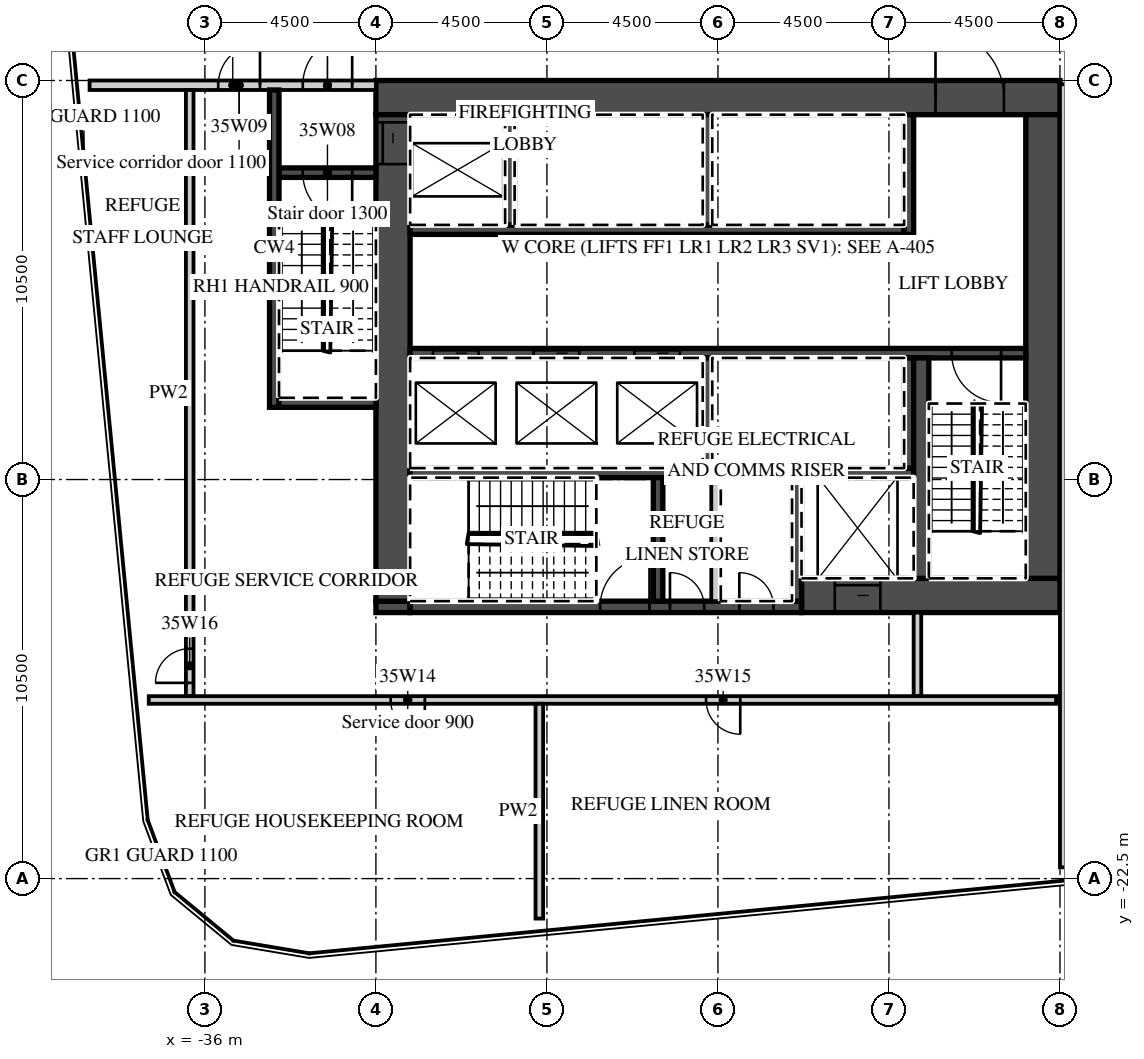
"""IFC4 building model, lengths in metres.
Left out: names, types, materials, properties, quantities, classifications, styles, units other than length and angle.
Written with IfcOpenShell. Run it as: python <this file> out.ifc"""

import sys

from ifc_helpers import new_model, si_unit, direction, frame, frame_2d, origin, place, context, subcontext, project, spatial, rectangle, extrude, element, fill, save


model = new_model("IFC4")
c1 = context("Model", 3, precision=1e-05, world=origin(), true_north=direction((0.0, 1.0)))
c2 = subcontext(c1, "Body", "Model", "MODEL_VIEW")
j1 = project(units=[si_unit("LENGTHUNIT", "METRE"), si_unit("PLANEANGLEUNIT", "RADIAN")], contexts=[c1])
p1 = place(None, origin())
s1 = spatial("IfcSite", under=j1, at=p1, CompositionType="ELEMENT")
p2 = place(p1, origin())
s2 = spatial("IfcBuilding", under=s1, at=p2, CompositionType="ELEMENT")
p3 = place(p2, frame((0.0, 0.0, 150.4)))
s3 = spatial("IfcBuildingStorey", under=s2, at=p3, CompositionType="ELEMENT", Elevation=150.4)
p4 = place(p3, frame((-31.5, -1.95, 0.0), z_axis=(0.0, 0.0, 1.0), x_axis=(1.0, 0.0, 0.0)))
e1 = element("IfcWall", 1, at=p4, inside=s3, PredefinedType="SHEAR", context=c2, shape_type="SweptSolid", body=[
    extrude(rectangle(XDim=18.0, YDim=0.9, at=frame_2d((9.0, 0.0))), origin(), (0.0, 0.0, 1.0), 4.2),
])
p5 = place(p4, frame((14.725, 0.0, 0.0)))
e2 = element("IfcOpeningElement", 2, at=p5, cuts=e1, PredefinedType="OPENING", context=c2, shape_type="SweptSolid", body=[
    extrude(rectangle(XDim=1.8, YDim=2.1, at=frame_2d((0.9, 1.05))), frame((0.0, 0.46, 0.0), z_axis=(0.0, -1.0, 0.0), x_axis=(1.0, 0.0, 0.0)), (0.0, 0.0, 1.0), 0.92),
])
p6 = place(p3, frame((-20.3, -15.05, 0.0), z_axis=(0.0, 0.0, 1.0), x_axis=(1.0, 0.0, 0.0)))
e3 = element("IfcWall", 3, at=p6, inside=s3, PredefinedType="SHEAR", context=c2, shape_type="SweptSolid", body=[
    extrude(rectangle(XDim=6.8, YDim=0.9, at=frame_2d((3.4, 0.0))), origin(), (0.0, 0.0, 1.0), 4.2),
])
p7 = place(p6, frame((0.875, 0.0, 0.0)))
e4 = element("IfcOpeningElement", 4, at=p7, cuts=e3, PredefinedType="OPENING", context=c2, shape_type="SweptSolid", body=[
    extrude(rectangle(XDim=1.2, YDim=2.1, at=frame_2d((0.6, 1.05))), frame((0.0, 0.46, 0.0), z_axis=(0.0, -1.0, 0.0), x_axis=(1.0, 0.0, 0.0)), (0.0, 0.0, 1.0), 0.92),
])
p8 = place(p3, frame((-31.5, -15.35, 0.0), z_axis=(0.0, 0.0, 1.0), x_axis=(1.0, 0.0, 0.0)))
e5 = element("IfcWall", 5, at=p8, inside=s3, PredefinedType="SHEAR", context=c2, shape_type="SweptSolid", body=[
    extrude(rectangle(XDim=0.9, YDim=0.3, at=frame_2d((0.45, 0.0))), origin(), (0.0, 0.0, 1.0), 4.2),
])
p9 = place(p3, frame((-30.6, -15.35, 0.0), z_axis=(0.0, 0.0, 1.0), x_axis=(1.0, 0.0, 0.0)))
e6 = element("IfcWall", 6, at=p9, inside=s3, PredefinedType="SHEAR", context=c2, shape_type="SweptSolid", body=[
    extrude(rectangle(XDim=10.3, YDim=0.3, at=frame_2d((5.15, 0.0))), origin(), (0.0, 0.0, 1.0), 4.2),
])
p10 = place(p9, frame((5.0, 0.0, 0.0)))
e7 = element("IfcOpeningElement", 7, at=p10, cuts=e6, PredefinedType="OPENING", context=c2, shape_type="SweptSolid", body=[
    extrude(rectangle(XDim=1.3, YDim=2.1, at=frame_2d((0.65, 1.05))), frame((0.0, 0.16, 0.0), z_axis=(0.0, -1.0, 0.0), x_axis=(1.0, 0.0, 0.0)), (0.0, 0.0, 1.0), 0.32),
])
p11 = place(p9, frame((6.837, 0.0, 0.0)))
e8 = element("IfcOpeningElement", 8, at=p11, cuts=e6, PredefinedType="OPENING", context=c2, shape_type="SweptSolid", body=[
    extrude(rectangle(XDim=0.9, YDim=2.1, at=frame_2d((0.45, 1.05))), frame((0.0, 0.16, 0.0), z_axis=(0.0, -1.0, 0.0), x_axis=(1.0, 0.0, 0.0)), (0.0, 0.0, 1.0), 0.32),
])
p12 = place(p9, frame((8.663, 0.0, 0.0)))
e9 = element("IfcOpeningElement", 9, at=p12, cuts=e6, PredefinedType="OPENING", context=c2, shape_type="SweptSolid", body=[
    extrude(rectangle(XDim=0.9, YDim=2.1, at=frame_2d((0.45, 1.05))), frame((0.0, 0.16, 0.0), z_axis=(0.0, -1.0, 0.0), x_axis=(1.0, 0.0, 0.0)), (0.0, 0.0, 1.0), 0.32),
])
p13 = place(p3, frame((-31.05, -15.2, 0.0), z_axis=(0.0, 0.0, 1.0), x_axis=(0.0, 1.0, 0.0)))
e10 = element("IfcWall", 10, at=p13, inside=s3, PredefinedType="SHEAR", context=c2, shape_type="SweptSolid", body=[
    extrude(rectangle(XDim=12.8, YDim=0.9, at=frame_2d((6.4, 0.0))), origin(), (0.0, 0.0, 1.0), 4.2),
])
p14 = place(p13, frame((11.5, 0.0, 0.0)))
e11 = element("IfcOpeningElement", 11, at=p14, cuts=e10, PredefinedType="OPENING", context=c2, shape_type="SweptSolid", body=[
    extrude(rectangle(XDim=1.1, YDim=2.1, at=frame_2d((0.55, 1.05))), frame((0.0, 0.46, 0.0), z_axis=(0.0, -1.0, 0.0), x_axis=(1.0, 0.0, 0.0)), (0.0, 0.0, 1.0), 0.92),
])
p15 = place(p3, frame((-13.95, -14.6, 0.0), z_axis=(0.0, 0.0, 1.0), x_axis=(0.0, 1.0, 0.0)))
e12 = element("IfcWall", 12, at=p15, inside=s3, PredefinedType="SHEAR", context=c2, shape_type="SweptSolid", body=[
    extrude(rectangle(XDim=12.2, YDim=0.9, at=frame_2d((6.1, 0.0))), origin(), (0.0, 0.0, 1.0), 4.2),
])
p16 = place(p3, frame((-30.6, -5.425, 0.0), z_axis=(0.0, 0.0, 1.0), x_axis=(1.0, 0.0, 0.0)))
e13 = element("IfcWall", 13, at=p16, inside=s3, PredefinedType="SHEAR", context=c2, shape_type="SweptSolid", body=[
    extrude(rectangle(XDim=13.0, YDim=0.25, at=frame_2d((6.5, 0.0))), origin(), (0.0, 0.0, 1.0), 4.2),
])
p17 = place(p3, frame((-17.475, -5.55, 0.0), z_axis=(0.0, 0.0, 1.0), x_axis=(0.0, 1.0, 0.0)))
e14 = element("IfcWall", 14, at=p17, inside=s3, PredefinedType="SHEAR", context=c2, shape_type="SweptSolid", body=[
    extrude(rectangle(XDim=3.15, YDim=0.25, at=frame_2d((1.575, 0.0))), origin(), (0.0, 0.0, 1.0), 4.2),
])
for number, where, z_axis, x_axis in (
    (15, (-27.975, -5.3, 0.0), (0.0, 0.0, 1.0), (0.0, 1.0, 0.0)),
    (16, (-22.775, -5.3, 0.0), (0.0, 0.0, 1.0), (0.0, 1.0, 0.0)),
):
    element("IfcWall", number, at=place(p3, frame(where, z_axis=z_axis, x_axis=x_axis)), inside=s3, PredefinedType="SHEAR", context=c2, shape_type="SweptSolid", body=[
        extrude(rectangle(XDim=2.9, YDim=0.25, at=frame_2d((1.45, 0.0))), origin(), (0.0, 0.0, 1.0), 4.2),
    ])
p18 = place(p3, frame((-30.6, -8.675, 0.0), z_axis=(0.0, 0.0, 1.0), x_axis=(1.0, 0.0, 0.0)))
e17 = element("IfcWall", 17, at=p18, inside=s3, PredefinedType="SHEAR", context=c2, shape_type="SweptSolid", body=[
    extrude(rectangle(XDim=16.2, YDim=0.25, at=frame_2d((8.1, 0.0))), origin(), (0.0, 0.0, 1.0), 4.2),
])
p19 = place(p18, frame((0.6, 0.0, 0.0)))
e18 = element("IfcOpeningElement", 18, at=p19, cuts=e17, PredefinedType="OPENING", context=c2, shape_type="SweptSolid", body=[
    extrude(rectangle(XDim=1.2, YDim=2.1, at=frame_2d((0.6, 1.05))), frame((0.0, 0.135, 0.0), z_axis=(0.0, -1.0, 0.0), x_axis=(1.0, 0.0, 0.0)), (0.0, 0.0, 1.0), 0.27),
])
p20 = place(p18, frame((3.25, 0.0, 0.0)))
e19 = element("IfcOpeningElement", 19, at=p20, cuts=e17, PredefinedType="OPENING", context=c2, shape_type="SweptSolid", body=[
    extrude(rectangle(XDim=1.2, YDim=2.1, at=frame_2d((0.6, 1.05))), frame((0.0, 0.135, 0.0), z_axis=(0.0, -1.0, 0.0), x_axis=(1.0, 0.0, 0.0)), (0.0, 0.0, 1.0), 0.27),
])
p21 = place(p18, frame((5.9, 0.0, 0.0)))
e20 = element("IfcOpeningElement", 20, at=p21, cuts=e17, PredefinedType="OPENING", context=c2, shape_type="SweptSolid", body=[
    extrude(rectangle(XDim=1.2, YDim=2.1, at=frame_2d((0.6, 1.05))), frame((0.0, 0.135, 0.0), z_axis=(0.0, -1.0, 0.0), x_axis=(1.0, 0.0, 0.0)), (0.0, 0.0, 1.0), 0.27),
])
p22 = place(p18, frame((14.25, 0.0, 0.0)))
e21 = element("IfcOpeningElement", 21, at=p22, cuts=e17, PredefinedType="OPENING", context=c2, shape_type="SweptSolid", body=[
    extrude(rectangle(XDim=1.3, YDim=2.1, at=frame_2d((0.65, 1.05))), frame((0.0, 0.135, 0.0), z_axis=(0.0, -1.0, 0.0), x_axis=(1.0, 0.0, 0.0)), (0.0, 0.0, 1.0), 0.27),
])
p23 = place(p3, frame((-30.6, -11.825, 0.0), z_axis=(0.0, 0.0, 1.0), x_axis=(1.0, 0.0, 0.0)))
e22 = element("IfcWall", 22, at=p23, inside=s3, PredefinedType="SHEAR", context=c2, shape_type="SweptSolid", body=[
    extrude(rectangle(XDim=13.25, YDim=0.25, at=frame_2d((6.625, 0.0))), origin(), (0.0, 0.0, 1.0), 4.2),
])
for number, where, z_axis, x_axis in (
    (23, (-17.475, -11.7, 0.0), (0.0, 0.0, 1.0), (0.0, 1.0, 0.0)),
    (24, (-22.775, -11.7, 0.0), (0.0, 0.0, 1.0), (0.0, 1.0, 0.0)),
):
    element("IfcWall", number, at=place(p3, frame(where, z_axis=z_axis, x_axis=x_axis)), inside=s3, PredefinedType="SHEAR", context=c2, shape_type="SweptSolid", body=[
        extrude(rectangle(XDim=2.9, YDim=0.25, at=frame_2d((1.45, 0.0))), origin(), (0.0, 0.0, 1.0), 4.2),
    ])
p24 = place(p3, frame((-17.15, -14.6, 0.0), z_axis=(0.0, 0.0, 1.0), x_axis=(0.0, 1.0, 0.0)))
e25 = element("IfcWall", 25, at=p24, inside=s3, PredefinedType="SHEAR", context=c2, shape_type="SweptSolid", body=[
    extrude(rectangle(XDim=5.8, YDim=0.4, at=frame_2d((2.9, 0.0))), origin(), (0.0, 0.0, 1.0), 4.2),
])
for number, where, z_axis, x_axis in (
    (26, (-20.425, -15.2, 0.0), (0.0, 0.0, 1.0), (0.0, 1.0, 0.0)),
    (27, (-24.075, -15.2, 0.0), (0.0, 0.0, 1.0), (0.0, 1.0, 0.0)),
):
    element("IfcWall", number, at=place(p3, frame(where, z_axis=z_axis, x_axis=x_axis)), inside=s3, PredefinedType="SHEAR", context=c2, shape_type="SweptSolid", body=[
        extrude(rectangle(XDim=3.25, YDim=0.25, at=frame_2d((1.625, 0.0))), origin(), (0.0, 0.0, 1.0), 4.2),
    ])
p25 = place(p3, frame((-22.55, -15.2, 0.0), z_axis=(0.0, 0.0, 1.0), x_axis=(0.0, 1.0, 0.0)))
e28 = element("IfcWall", 28, at=p25, inside=s3, PredefinedType="PARTITIONING", context=c2, shape_type="SweptSolid", body=[
    extrude(rectangle(XDim=3.25, YDim=0.25, at=frame_2d((1.625, 0.0))), origin(), (0.0, 0.0, 1.0), 4.2),
])
p26 = place(p3, frame((-39.035, -1.625, 0.0), z_axis=(0.0, 0.0, 1.0), x_axis=(1.0, 0.0, 0.0)))
e29 = element("IfcWall", 29, at=p26, inside=s3, PredefinedType="PARTITIONING", context=c2, shape_type="SweptSolid", body=[
    extrude(rectangle(XDim=7.535, YDim=0.25, at=frame_2d((3.768, 0.0))), origin(), (0.0, 0.0, 1.0), 4.2),
])
p27 = place(p26, frame((5.61, 0.0, 0.0)))
e30 = element("IfcOpeningElement", 30, at=p27, cuts=e29, PredefinedType="OPENING", context=c2, shape_type="SweptSolid", body=[
    extrude(rectangle(XDim=1.3, YDim=2.1, at=frame_2d((0.65, 1.05))), frame((0.0, 0.135, 0.0), z_axis=(0.0, -1.0, 0.0), x_axis=(1.0, 0.0, 0.0)), (0.0, 0.0, 1.0), 0.27),
])
p28 = place(p26, frame((3.385, 0.0, 0.0)))
e31 = element("IfcOpeningElement", 31, at=p28, cuts=e29, PredefinedType="OPENING", context=c2, shape_type="SweptSolid", body=[
    extrude(rectangle(XDim=1.1, YDim=2.1, at=frame_2d((0.55, 1.05))), frame((0.0, 0.135, 0.0), z_axis=(0.0, -1.0, 0.0), x_axis=(1.0, 0.0, 0.0)), (0.0, 0.0, 1.0), 0.27),
])
p29 = place(p3, frame((-34.05, -3.925, 0.0), z_axis=(0.0, 0.0, 1.0), x_axis=(1.0, 0.0, 0.0)))
e32 = element("IfcWall", 32, at=p29, inside=s3, PredefinedType="SHEAR", context=c2, shape_type="SweptSolid", body=[
    extrude(rectangle(XDim=2.55, YDim=0.25, at=frame_2d((1.275, 0.0))), origin(), (0.0, 0.0, 1.0), 4.2),
])
p30 = place(p29, frame((0.625, 0.0, 0.0)))
e33 = element("IfcOpeningElement", 33, at=p30, cuts=e32, PredefinedType="OPENING", context=c2, shape_type="SweptSolid", body=[
    extrude(rectangle(XDim=1.3, YDim=2.1, at=frame_2d((0.65, 1.05))), frame((0.0, 0.135, 0.0), z_axis=(0.0, -1.0, 0.0), x_axis=(1.0, 0.0, 0.0)), (0.0, 0.0, 1.0), 0.27),
])
p31 = place(p3, frame((-34.175, -10.1, 0.0), z_axis=(0.0, 0.0, 1.0), x_axis=(0.0, 1.0, 0.0)))
e34 = element("IfcWall", 34, at=p31, inside=s3, PredefinedType="SHEAR", context=c2, shape_type="SweptSolid", body=[
    extrude(rectangle(XDim=8.35, YDim=0.25, at=frame_2d((4.175, 0.0))), origin(), (0.0, 0.0, 1.0), 4.2),
])
p32 = place(p3, frame((-34.05, -9.975, 0.0), z_axis=(0.0, 0.0, 1.0), x_axis=(1.0, 0.0, 0.0)))
e35 = element("IfcWall", 35, at=p32, inside=s3, PredefinedType="SHEAR", context=c2, shape_type="SweptSolid", body=[
    extrude(rectangle(XDim=2.55, YDim=0.25, at=frame_2d((1.275, 0.0))), origin(), (0.0, 0.0, 1.0), 4.2),
])
p33 = place(p3, frame((-17.25, -17.7, 0.0), z_axis=(0.0, 0.0, 1.0), x_axis=(0.0, 1.0, 0.0)))
e36 = element("IfcWall", 36, at=p33, inside=s3, PredefinedType="PARTITIONING", context=c2, shape_type="SweptSolid", body=[
    extrude(rectangle(XDim=2.2, YDim=0.2, at=frame_2d((1.1, 0.0))), origin(), (0.0, 0.0, 1.0), 4.2),
])
p34 = place(p3, frame((-36.4, -17.7, 0.0), z_axis=(0.0, 0.0, 1.0), x_axis=(0.0, 1.0, 0.0)))
e37 = element("IfcWall", 37, at=p34, inside=s3, PredefinedType="PARTITIONING", context=c2, shape_type="SweptSolid", body=[
    extrude(rectangle(XDim=15.95, YDim=0.2, at=frame_2d((7.975, 0.0))), origin(), (0.0, 0.0, 1.0), 4.2),
])
p35 = place(p34, frame((0.35, 0.0, 0.0)))
e38 = element("IfcOpeningElement", 38, at=p35, cuts=e37, PredefinedType="OPENING", context=c2, shape_type="SweptSolid", body=[
    extrude(rectangle(XDim=0.9, YDim=2.1, at=frame_2d((0.45, 1.05))), frame((0.0, 0.11, 0.0), z_axis=(0.0, -1.0, 0.0), x_axis=(1.0, 0.0, 0.0)), (0.0, 0.0, 1.0), 0.22),
])
p36 = place(p3, frame((-37.477, -17.8, 0.0), z_axis=(0.0, 0.0, 1.0), x_axis=(1.0, 0.0, 0.0)))
e39 = element("IfcWall", 39, at=p36, inside=s3, PredefinedType="PARTITIONING", context=c2, shape_type="SweptSolid", body=[
    extrude(rectangle(XDim=23.877, YDim=0.2, at=frame_2d((11.938, 0.0))), origin(), (0.0, 0.0, 1.0), 4.2),
])
p37 = place(p36, frame((6.365, 0.0, 0.0)))
e40 = element("IfcOpeningElement", 40, at=p37, cuts=e39, PredefinedType="OPENING", context=c2, shape_type="SweptSolid", body=[
    extrude(rectangle(XDim=0.9, YDim=2.1, at=frame_2d((0.45, 1.05))), frame((0.0, 0.11, 0.0), z_axis=(0.0, -1.0, 0.0), x_axis=(1.0, 0.0, 0.0)), (0.0, 0.0, 1.0), 0.22),
])
p38 = place(p36, frame((14.665, 0.0, 0.0)))
e41 = element("IfcOpeningElement", 41, at=p38, cuts=e39, PredefinedType="OPENING", context=c2, shape_type="SweptSolid", body=[
    extrude(rectangle(XDim=0.9, YDim=2.1, at=frame_2d((0.45, 1.05))), frame((0.0, 0.11, 0.0), z_axis=(0.0, -1.0, 0.0), x_axis=(1.0, 0.0, 0.0)), (0.0, 0.0, 1.0), 0.22),
])
p39 = place(p3, frame((-27.2, -23.552, 0.0), z_axis=(0.0, 0.0, 1.0), x_axis=(0.0, 1.0, 0.0)))
e42 = element("IfcWall", 42, at=p39, inside=s3, PredefinedType="PARTITIONING", context=c2, shape_type="SweptSolid", body=[
    extrude(rectangle(XDim=5.653, YDim=0.2, at=frame_2d((2.826, 0.0))), origin(), (0.0, 0.0, 1.0), 4.2),
])
p40 = place(p3, frame((-13.4, -22.204, 0.0), z_axis=(0.0, 0.0, 1.0), x_axis=(0.0, 1.0, 0.0)))
e43 = element("IfcWall", 43, at=p40, inside=s3, PredefinedType="PARTITIONING", context=c2, shape_type="SweptSolid", body=[
    extrude(rectangle(XDim=20.604, YDim=0.2, at=frame_2d((10.302, 0.0))), origin(), (0.0, 0.0, 1.0), 4.2),
])
p41 = place(p19, origin())
e44 = element("IfcDoor", 44, at=p41, inside=s3, OperationType="SLIDING_TO_LEFT", PredefinedType="DOOR", context=c2, shape_type="SweptSolid", body=[
    extrude(rectangle(XDim=1.2, YDim=2.1, at=frame_2d((0.6, 1.05))), frame((0.0, 0.025, 0.0), z_axis=(0.0, -1.0, 0.0), x_axis=(1.0, 0.0, 0.0)), (0.0, 0.0, 1.0), 0.05),
])
fill(e18, e44)
p42 = place(p20, origin())
e45 = element("IfcDoor", 45, at=p42, inside=s3, OperationType="SLIDING_TO_RIGHT", PredefinedType="DOOR", context=c2, shape_type="SweptSolid", body=[
    extrude(rectangle(XDim=1.2, YDim=2.1, at=frame_2d((0.6, 1.05))), frame((0.0, 0.025, 0.0), z_axis=(0.0, -1.0, 0.0), x_axis=(1.0, 0.0, 0.0)), (0.0, 0.0, 1.0), 0.05),
])
fill(e19, e45)
p43 = place(p21, origin())
e46 = element("IfcDoor", 46, at=p43, inside=s3, OperationType="SLIDING_TO_RIGHT", PredefinedType="DOOR", context=c2, shape_type="SweptSolid", body=[
    extrude(rectangle(XDim=1.2, YDim=2.1, at=frame_2d((0.6, 1.05))), frame((0.0, 0.025, 0.0), z_axis=(0.0, -1.0, 0.0), x_axis=(1.0, 0.0, 0.0)), (0.0, 0.0, 1.0), 0.05),
])
fill(e20, e46)
p44 = place(p7, origin())
e47 = element("IfcDoor", 47, at=p44, inside=s3, OperationType="SLIDING_TO_LEFT", PredefinedType="DOOR", context=c2, shape_type="SweptSolid", body=[
    extrude(rectangle(XDim=1.2, YDim=2.1, at=frame_2d((0.6, 1.05))), frame((0.0, 0.025, 0.0), z_axis=(0.0, -1.0, 0.0), x_axis=(1.0, 0.0, 0.0)), (0.0, 0.0, 1.0), 0.05),
])
fill(e4, e47)
p45 = place(p14, origin())
e48 = element("IfcDoor", 48, at=p45, inside=s3, OperationType="SLIDING_TO_RIGHT", PredefinedType="DOOR", context=c2, shape_type="SweptSolid", body=[
    extrude(rectangle(XDim=1.1, YDim=2.1, at=frame_2d((0.55, 1.05))), frame((0.0, 0.025, 0.0), z_axis=(0.0, -1.0, 0.0), x_axis=(1.0, 0.0, 0.0)), (0.0, 0.0, 1.0), 0.05),
])
fill(e11, e48)
p46 = place(p5, origin())
e49 = element("IfcDoor", 49, at=p46, inside=s3, OperationType="DOUBLE_DOOR_DOUBLE_SWING", PredefinedType="DOOR", context=c2, shape_type="SweptSolid", body=[
    extrude(rectangle(XDim=1.8, YDim=2.1, at=frame_2d((0.9, 1.05))), frame((0.0, 0.025, 0.0), z_axis=(0.0, -1.0, 0.0), x_axis=(1.0, 0.0, 0.0)), (0.0, 0.0, 1.0), 0.05),
])
fill(e2, e49)
p47 = place(p27, origin())
e50 = element("IfcDoor", 50, at=p47, inside=s3, OperationType="SINGLE_SWING_RIGHT", PredefinedType="DOOR", context=c2, shape_type="SweptSolid", body=[
    extrude(rectangle(XDim=1.3, YDim=2.1, at=frame_2d((0.65, 1.05))), frame((0.0, 0.025, 0.0), z_axis=(0.0, -1.0, 0.0), x_axis=(1.0, 0.0, 0.0)), (0.0, 0.0, 1.0), 0.05),
])
fill(e30, e50)
p48 = place(p30, origin())
e51 = element("IfcDoor", 51, at=p48, inside=s3, OperationType="SINGLE_SWING_RIGHT", PredefinedType="DOOR", context=c2, shape_type="SweptSolid", body=[
    extrude(rectangle(XDim=1.3, YDim=2.1, at=frame_2d((0.65, 1.05))), frame((0.0, 0.025, 0.0), z_axis=(0.0, -1.0, 0.0), x_axis=(1.0, 0.0, 0.0)), (0.0, 0.0, 1.0), 0.05),
])
fill(e33, e51)
p49 = place(p28, origin())
e52 = element("IfcDoor", 52, at=p49, inside=s3, OperationType="SINGLE_SWING_RIGHT", PredefinedType="DOOR", context=c2, shape_type="SweptSolid", body=[
    extrude(rectangle(XDim=1.1, YDim=2.1, at=frame_2d((0.55, 1.05))), frame((0.0, 0.025, 0.0), z_axis=(0.0, -1.0, 0.0), x_axis=(1.0, 0.0, 0.0)), (0.0, 0.0, 1.0), 0.05),
])
fill(e31, e52)
p50 = place(p22, origin())
e53 = element("IfcDoor", 53, at=p50, inside=s3, OperationType="SINGLE_SWING_RIGHT", PredefinedType="DOOR", context=c2, shape_type="SweptSolid", body=[
    extrude(rectangle(XDim=1.3, YDim=2.1, at=frame_2d((0.65, 1.05))), frame((0.0, 0.025, 0.0), z_axis=(0.0, -1.0, 0.0), x_axis=(1.0, 0.0, 0.0)), (0.0, 0.0, 1.0), 0.05),
])
fill(e21, e53)
p51 = place(p10, origin())
e54 = element("IfcDoor", 54, at=p51, inside=s3, OperationType="SINGLE_SWING_RIGHT", PredefinedType="DOOR", context=c2, shape_type="SweptSolid", body=[
    extrude(rectangle(XDim=1.3, YDim=2.1, at=frame_2d((0.65, 1.05))), frame((0.0, 0.025, 0.0), z_axis=(0.0, -1.0, 0.0), x_axis=(1.0, 0.0, 0.0)), (0.0, 0.0, 1.0), 0.05),
])
fill(e7, e54)
p52 = place(p11, origin())
e55 = element("IfcDoor", 55, at=p52, inside=s3, OperationType="SINGLE_SWING_LEFT", PredefinedType="DOOR", context=c2, shape_type="SweptSolid", body=[
    extrude(rectangle(XDim=0.9, YDim=2.1, at=frame_2d((0.45, 1.05))), frame((0.0, 0.025, 0.0), z_axis=(0.0, -1.0, 0.0), x_axis=(1.0, 0.0, 0.0)), (0.0, 0.0, 1.0), 0.05),
])
fill(e8, e55)
p53 = place(p12, origin())
e56 = element("IfcDoor", 56, at=p53, inside=s3, OperationType="SINGLE_SWING_LEFT", PredefinedType="DOOR", context=c2, shape_type="SweptSolid", body=[
    extrude(rectangle(XDim=0.9, YDim=2.1, at=frame_2d((0.45, 1.05))), frame((0.0, 0.025, 0.0), z_axis=(0.0, -1.0, 0.0), x_axis=(1.0, 0.0, 0.0)), (0.0, 0.0, 1.0), 0.05),
])
fill(e9, e56)
p54 = place(p37, origin())
e57 = element("IfcDoor", 57, at=p54, inside=s3, OperationType="SINGLE_SWING_RIGHT", PredefinedType="DOOR", context=c2, shape_type="SweptSolid", body=[
    extrude(rectangle(XDim=0.9, YDim=2.1, at=frame_2d((0.45, 1.05))), frame((0.0, 0.025, 0.0), z_axis=(0.0, -1.0, 0.0), x_axis=(1.0, 0.0, 0.0)), (0.0, 0.0, 1.0), 0.05),
])
fill(e40, e57)
p55 = place(p38, origin())
e58 = element("IfcDoor", 58, at=p55, inside=s3, OperationType="SINGLE_SWING_RIGHT", PredefinedType="DOOR", context=c2, shape_type="SweptSolid", body=[
    extrude(rectangle(XDim=0.9, YDim=2.1, at=frame_2d((0.45, 1.05))), frame((0.0, 0.025, 0.0), z_axis=(0.0, -1.0, 0.0), x_axis=(1.0, 0.0, 0.0)), (0.0, 0.0, 1.0), 0.05),
])
fill(e41, e58)
p56 = place(p35, origin())
e59 = element("IfcDoor", 59, at=p56, inside=s3, OperationType="SINGLE_SWING_LEFT", PredefinedType="DOOR", context=c2, shape_type="SweptSolid", body=[
    extrude(rectangle(XDim=0.9, YDim=2.1, at=frame_2d((0.45, 1.05))), frame((0.0, 0.025, 0.0), z_axis=(0.0, -1.0, 0.0), x_axis=(1.0, 0.0, 0.0)), (0.0, 0.0, 1.0), 0.05),
])
fill(e38, e59)
save(model, sys.argv[1])
